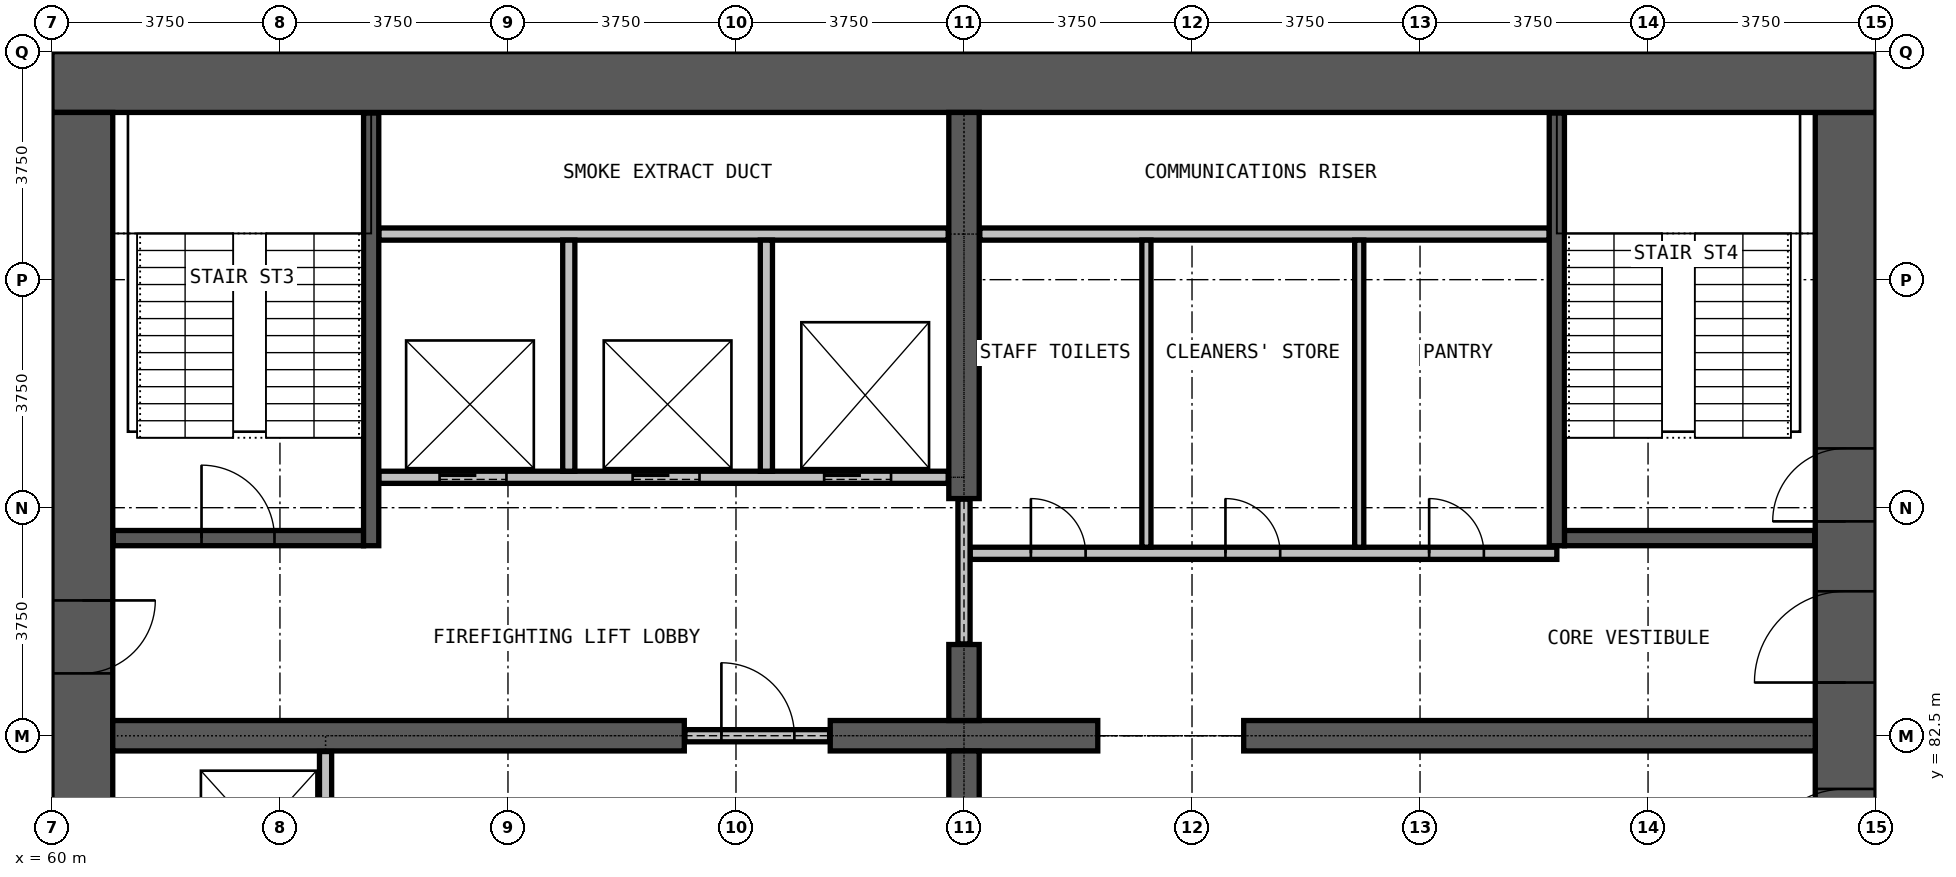
"""IFC4 building model, lengths in metres.
Left out: names, types, materials, properties, quantities, classifications, styles, units other than length and angle.
Written with IfcOpenShell. Run it as: python <this file> out.ifc"""

import sys

from ifc_helpers import new_model, si_unit, direction, frame, frame_2d, origin, place, context, subcontext, project, spatial, rectangle, extrude, element, fill, save


model = new_model("IFC4")
c1 = context("Model", 3, precision=1e-05, world=origin(), true_north=direction((0.0, 1.0)))
c2 = subcontext(c1, "Body", "Model", "MODEL_VIEW")
j1 = project(units=[si_unit("LENGTHUNIT", "METRE"), si_unit("PLANEANGLEUNIT", "RADIAN")], contexts=[c1])
p1 = place(None, origin())
s1 = spatial("IfcSite", under=j1, at=p1, CompositionType="ELEMENT")
p2 = place(p1, origin())
s2 = spatial("IfcBuilding", under=s1, at=p2, CompositionType="ELEMENT")
p3 = place(p2, frame((0.0, 0.0, 35.0)))
s3 = spatial("IfcBuildingStorey", under=s2, at=p3, CompositionType="ELEMENT", Elevation=35.0)
p4 = place(p3, frame((89.5, 72.25, 0.0), z_axis=(0.0, 0.0, 1.0), x_axis=(0.0, 1.0, 0.0)))
e1 = element("IfcWall", 1, at=p4, inside=s3, PredefinedType="SHEAR", context=c2, shape_type="SweptSolid", body=[
    extrude(rectangle(XDim=20.5, YDim=1.0, at=frame_2d((10.25, 0.0))), origin(), (0.0, 0.0, 1.0), 4.5),
])
p5 = place(p4, frame((0.275, 0.0, 0.0)))
e2 = element("IfcOpeningElement", 2, at=p5, cuts=e1, PredefinedType="OPENING", context=c2, shape_type="SweptSolid", body=[
    extrude(rectangle(XDim=1.2, YDim=2.2, at=frame_2d((0.6, 1.1))), frame((0.0, 0.51, 0.0), z_axis=(0.0, -1.0, 0.0), x_axis=(1.0, 0.0, 0.0)), (0.0, 0.0, 1.0), 1.02),
])
p6 = place(p4, frame((13.775, 0.0, 0.0)))
e3 = element("IfcOpeningElement", 3, at=p6, cuts=e1, PredefinedType="OPENING", context=c2, shape_type="SweptSolid", body=[
    extrude(rectangle(XDim=1.2, YDim=2.2, at=frame_2d((0.6, 1.1))), frame((0.0, 0.51, 0.0), z_axis=(0.0, -1.0, 0.0), x_axis=(1.0, 0.0, 0.0)), (0.0, 0.0, 1.0), 1.02),
])
p7 = place(p4, frame((7.875, 0.0, 0.0)))
e4 = element("IfcOpeningElement", 4, at=p7, cuts=e1, PredefinedType="OPENING", context=c2, shape_type="SweptSolid", body=[
    extrude(rectangle(XDim=1.5, YDim=2.2, at=frame_2d((0.75, 1.1))), frame((0.0, 0.51, 0.0), z_axis=(0.0, -1.0, 0.0), x_axis=(1.0, 0.0, 0.0)), (0.0, 0.0, 1.0), 1.02),
])
p8 = place(p4, frame((11.125, 0.0, 0.0)))
e5 = element("IfcOpeningElement", 5, at=p8, cuts=e1, PredefinedType="OPENING", context=c2, shape_type="SweptSolid", body=[
    extrude(rectangle(XDim=1.5, YDim=2.2, at=frame_2d((0.75, 1.1))), frame((0.0, 0.51, 0.0), z_axis=(0.0, -1.0, 0.0), x_axis=(1.0, 0.0, 0.0)), (0.0, 0.0, 1.0), 1.02),
])
p9 = place(p3, frame((90.0, 93.25, 0.0), z_axis=(0.0, 0.0, 1.0), x_axis=(-1.0, 0.0, 0.0)))
e6 = element("IfcWall", 6, at=p9, inside=s3, PredefinedType="SHEAR", context=c2, shape_type="SweptSolid", body=[
    extrude(rectangle(XDim=30.0, YDim=1.0, at=frame_2d((15.0, 0.0))), origin(), (0.0, 0.0, 1.0), 4.5),
])
p10 = place(p3, frame((60.5, 92.75, 0.0), z_axis=(0.0, 0.0, 1.0), x_axis=(0.0, -1.0, 0.0)))
e7 = element("IfcWall", 7, at=p10, inside=s3, PredefinedType="SHEAR", context=c2, shape_type="SweptSolid", body=[
    extrude(rectangle(XDim=20.5, YDim=1.0, at=frame_2d((10.25, 0.0))), origin(), (0.0, 0.0, 1.0), 4.5),
])
p11 = place(p10, frame((19.025, 0.0, 0.0)))
e8 = element("IfcOpeningElement", 8, at=p11, cuts=e7, PredefinedType="OPENING", context=c2, shape_type="SweptSolid", body=[
    extrude(rectangle(XDim=1.2, YDim=2.2, at=frame_2d((0.6, 1.1))), frame((0.0, 0.51, 0.0), z_axis=(0.0, -1.0, 0.0), x_axis=(1.0, 0.0, 0.0)), (0.0, 0.0, 1.0), 1.02),
])
p12 = place(p10, frame((8.025, 0.0, 0.0)))
e9 = element("IfcOpeningElement", 9, at=p12, cuts=e7, PredefinedType="OPENING", context=c2, shape_type="SweptSolid", body=[
    extrude(rectangle(XDim=1.2, YDim=2.2, at=frame_2d((0.6, 1.1))), frame((0.0, 0.51, 0.0), z_axis=(0.0, -1.0, 0.0), x_axis=(1.0, 0.0, 0.0)), (0.0, 0.0, 1.0), 1.02),
])
p13 = place(p3, frame((61.0, 82.5, 0.0), z_axis=(0.0, 0.0, 1.0), x_axis=(1.0, 0.0, 0.0)))
e10 = element("IfcWall", 10, at=p13, inside=s3, PredefinedType="SHEAR", context=c2, shape_type="SweptSolid", body=[
    extrude(rectangle(XDim=9.4, YDim=0.5, at=frame_2d((4.7, 0.0))), origin(), (0.0, 0.0, 1.0), 4.5),
])
p14 = place(p3, frame((72.8, 82.5, 0.0), z_axis=(0.0, 0.0, 1.0), x_axis=(1.0, 0.0, 0.0)))
e11 = element("IfcWall", 11, at=p14, inside=s3, PredefinedType="SHEAR", context=c2, shape_type="SweptSolid", body=[
    extrude(rectangle(XDim=4.4, YDim=0.5, at=frame_2d((2.2, 0.0))), origin(), (0.0, 0.0, 1.0), 4.5),
])
p15 = place(p3, frame((79.6, 82.5, 0.0), z_axis=(0.0, 0.0, 1.0), x_axis=(1.0, 0.0, 0.0)))
e12 = element("IfcWall", 12, at=p15, inside=s3, PredefinedType="SHEAR", context=c2, shape_type="SweptSolid", body=[
    extrude(rectangle(XDim=9.4, YDim=0.5, at=frame_2d((4.7, 0.0))), origin(), (0.0, 0.0, 1.0), 4.5),
])
for number, where, z_axis, x_axis in (
    (13, (75.0, 81.0, 0.0), (0.0, 0.0, 1.0), (0.0, 1.0, 0.0)),
    (14, (75.0, 82.75, 0.0), (0.0, 0.0, 1.0), (0.0, 1.0, 0.0)),
):
    element("IfcWall", number, at=place(p3, frame(where, z_axis=z_axis, x_axis=x_axis)), inside=s3, PredefinedType="SHEAR", context=c2, shape_type="SweptSolid", body=[
        extrude(rectangle(XDim=1.25, YDim=0.5, at=frame_2d((0.625, 0.0))), origin(), (0.0, 0.0, 1.0), 4.5),
    ])
p16 = place(p3, frame((75.0, 86.4, 0.0), z_axis=(0.0, 0.0, 1.0), x_axis=(0.0, 1.0, 0.0)))
e15 = element("IfcWall", 15, at=p16, inside=s3, PredefinedType="SHEAR", context=c2, shape_type="SweptSolid", body=[
    extrude(rectangle(XDim=6.35, YDim=0.5, at=frame_2d((3.175, 0.0))), origin(), (0.0, 0.0, 1.0), 4.5),
])
p17 = place(p3, frame((70.41, 82.5, 0.0), z_axis=(0.0, 0.0, 1.0), x_axis=(1.0, 0.0, 0.0)))
e16 = element("IfcWall", 16, at=p17, inside=s3, PredefinedType="PARTITIONING", context=c2, shape_type="SweptSolid", body=[
    extrude(rectangle(XDim=2.38, YDim=0.2, at=frame_2d((1.19, 0.0))), origin(), (0.0, 0.0, 1.0), 2.4),
])
p18 = place(p17, frame((0.6, 0.0, 0.0)))
e17 = element("IfcOpeningElement", 17, at=p18, cuts=e16, PredefinedType="OPENING", context=c2, shape_type="SweptSolid", body=[
    extrude(rectangle(XDim=1.2, YDim=2.2, at=frame_2d((0.6, 1.1))), frame((0.0, 0.11, 0.0), z_axis=(0.0, -1.0, 0.0), x_axis=(1.0, 0.0, 0.0)), (0.0, 0.0, 1.0), 0.22),
])
p19 = place(p3, frame((75.1, 85.5, 0.0), z_axis=(0.0, 0.0, 1.0), x_axis=(1.0, 0.0, 0.0)))
e18 = element("IfcWall", 18, at=p19, inside=s3, PredefinedType="PARTITIONING", context=c2, shape_type="SweptSolid", body=[
    extrude(rectangle(XDim=9.65, YDim=0.2, at=frame_2d((4.825, 0.0))), origin(), (0.0, 0.0, 1.0), 4.2),
])
p20 = place(p19, frame((1.0, 0.0, 0.0)))
e19 = element("IfcOpeningElement", 19, at=p20, cuts=e18, PredefinedType="OPENING", context=c2, shape_type="SweptSolid", body=[
    extrude(rectangle(XDim=0.9, YDim=2.2, at=frame_2d((0.45, 1.1))), frame((0.0, 0.11, 0.0), z_axis=(0.0, -1.0, 0.0), x_axis=(1.0, 0.0, 0.0)), (0.0, 0.0, 1.0), 0.22),
])
p21 = place(p19, frame((4.2, 0.0, 0.0)))
e20 = element("IfcOpeningElement", 20, at=p21, cuts=e18, PredefinedType="OPENING", context=c2, shape_type="SweptSolid", body=[
    extrude(rectangle(XDim=0.9, YDim=2.2, at=frame_2d((0.45, 1.1))), frame((0.0, 0.11, 0.0), z_axis=(0.0, -1.0, 0.0), x_axis=(1.0, 0.0, 0.0)), (0.0, 0.0, 1.0), 0.22),
])
p22 = place(p19, frame((7.55, 0.0, 0.0)))
e21 = element("IfcOpeningElement", 21, at=p22, cuts=e18, PredefinedType="OPENING", context=c2, shape_type="SweptSolid", body=[
    extrude(rectangle(XDim=0.9, YDim=2.2, at=frame_2d((0.45, 1.1))), frame((0.0, 0.11, 0.0), z_axis=(0.0, -1.0, 0.0), x_axis=(1.0, 0.0, 0.0)), (0.0, 0.0, 1.0), 0.22),
])
p23 = place(p3, frame((75.26, 90.75, 0.0), z_axis=(0.0, 0.0, 1.0), x_axis=(1.0, 0.0, 0.0)))
e22 = element("IfcWall", 22, at=p23, inside=s3, PredefinedType="PARTITIONING", context=c2, shape_type="SweptSolid", body=[
    extrude(rectangle(XDim=9.365, YDim=0.2, at=frame_2d((4.683, 0.0))), origin(), (0.0, 0.0, 1.0), 4.2),
])
p24 = place(p3, frame((75.0, 84.01, 0.0), z_axis=(0.0, 0.0, 1.0), x_axis=(0.0, 1.0, 0.0)))
e23 = element("IfcWall", 23, at=p24, inside=s3, PredefinedType="PARTITIONING", context=c2, shape_type="SweptSolid", body=[
    extrude(rectangle(XDim=2.38, YDim=0.2, at=frame_2d((1.19, 0.0))), origin(), (0.0, 0.0, 1.0), 2.4),
])
for number, where, z_axis, x_axis in (
    (24, (78.0, 85.6, 0.0), (0.0, 0.0, 1.0), (0.0, 1.0, 0.0)),
    (25, (81.5, 85.6, 0.0), (0.0, 0.0, 1.0), (0.0, 1.0, 0.0)),
):
    element("IfcWall", number, at=place(p3, frame(where, z_axis=z_axis, x_axis=x_axis)), inside=s3, PredefinedType="PARTITIONING", context=c2, shape_type="SweptSolid", body=[
        extrude(rectangle(XDim=5.05, YDim=0.15, at=frame_2d((2.525, 0.0))), origin(), (0.0, 0.0, 1.0), 4.2),
    ])
p25 = place(p3, frame((65.375, 86.75, 0.0), z_axis=(0.0, 0.0, 1.0), x_axis=(1.0, 0.0, 0.0)))
e26 = element("IfcWall", 26, at=p25, inside=s3, PredefinedType="PARTITIONING", context=c2, shape_type="SweptSolid", body=[
    extrude(rectangle(XDim=9.365, YDim=0.2, at=frame_2d((4.683, 0.0))), origin(), (0.0, 0.0, 1.0), 4.2),
])
p26 = place(p25, frame((1.0, 0.0, 0.0)))
e27 = element("IfcOpeningElement", 27, at=p26, cuts=e26, PredefinedType="OPENING", context=c2, shape_type="SweptSolid", body=[
    extrude(rectangle(XDim=1.1, YDim=2.2, at=frame_2d((0.55, 1.1))), frame((0.0, 0.11, 0.0), z_axis=(0.0, -1.0, 0.0), x_axis=(1.0, 0.0, 0.0)), (0.0, 0.0, 1.0), 0.22),
])
p27 = place(p25, frame((4.175, 0.0, 0.0)))
e28 = element("IfcOpeningElement", 28, at=p27, cuts=e26, PredefinedType="OPENING", context=c2, shape_type="SweptSolid", body=[
    extrude(rectangle(XDim=1.1, YDim=2.2, at=frame_2d((0.55, 1.1))), frame((0.0, 0.11, 0.0), z_axis=(0.0, -1.0, 0.0), x_axis=(1.0, 0.0, 0.0)), (0.0, 0.0, 1.0), 0.22),
])
p28 = place(p25, frame((7.325, 0.0, 0.0)))
e29 = element("IfcOpeningElement", 29, at=p28, cuts=e26, PredefinedType="OPENING", context=c2, shape_type="SweptSolid", body=[
    extrude(rectangle(XDim=1.1, YDim=2.2, at=frame_2d((0.55, 1.1))), frame((0.0, 0.11, 0.0), z_axis=(0.0, -1.0, 0.0), x_axis=(1.0, 0.0, 0.0)), (0.0, 0.0, 1.0), 0.22),
])
p29 = place(p3, frame((65.375, 90.75, 0.0), z_axis=(0.0, 0.0, 1.0), x_axis=(1.0, 0.0, 0.0)))
e30 = element("IfcWall", 30, at=p29, inside=s3, PredefinedType="PARTITIONING", context=c2, shape_type="SweptSolid", body=[
    extrude(rectangle(XDim=9.365, YDim=0.2, at=frame_2d((4.683, 0.0))), origin(), (0.0, 0.0, 1.0), 4.2),
])
p30 = place(p3, frame((64.5, 79.375, 0.0), z_axis=(0.0, 0.0, 1.0), x_axis=(0.0, 1.0, 0.0)))
e31 = element("IfcWall", 31, at=p30, inside=s3, PredefinedType="PARTITIONING", context=c2, shape_type="SweptSolid", body=[
    extrude(rectangle(XDim=2.865, YDim=0.2, at=frame_2d((1.433, 0.0))), origin(), (0.0, 0.0, 1.0), 4.2),
])
for number, where, z_axis, x_axis in (
    (32, (68.5, 86.85, 0.0), (0.0, 0.0, 1.0), (0.0, 1.0, 0.0)),
    (33, (71.75, 86.85, 0.0), (0.0, 0.0, 1.0), (0.0, 1.0, 0.0)),
):
    element("IfcWall", number, at=place(p3, frame(where, z_axis=z_axis, x_axis=x_axis)), inside=s3, PredefinedType="PARTITIONING", context=c2, shape_type="SweptSolid", body=[
        extrude(rectangle(XDim=3.8, YDim=0.2, at=frame_2d((1.9, 0.0))), origin(), (0.0, 0.0, 1.0), 4.2),
    ])
p31 = place(p3, frame((61.01, 85.75, 0.0), z_axis=(0.0, 0.0, 1.0), x_axis=(1.0, 0.0, 0.0)))
e34 = element("IfcWall", 34, at=p31, inside=s3, PredefinedType="PARTITIONING", context=c2, shape_type="SweptSolid", body=[
    extrude(rectangle(XDim=4.115, YDim=0.25, at=frame_2d((2.058, 0.0))), origin(), (0.0, 0.0, 1.0), 4.2),
])
p32 = place(p31, frame((1.45, 0.0, 0.0)))
e35 = element("IfcOpeningElement", 35, at=p32, cuts=e34, PredefinedType="OPENING", context=c2, shape_type="SweptSolid", body=[
    extrude(rectangle(XDim=1.2, YDim=2.2, at=frame_2d((0.6, 1.1))), frame((0.0, 0.135, 0.0), z_axis=(0.0, -1.0, 0.0), x_axis=(1.0, 0.0, 0.0)), (0.0, 0.0, 1.0), 0.27),
])
p33 = place(p3, frame((84.875, 85.75, 0.0), z_axis=(0.0, 0.0, 1.0), x_axis=(1.0, 0.0, 0.0)))
e36 = element("IfcWall", 36, at=p33, inside=s3, PredefinedType="PARTITIONING", context=c2, shape_type="SweptSolid", body=[
    extrude(rectangle(XDim=4.115, YDim=0.25, at=frame_2d((2.058, 0.0))), origin(), (0.0, 0.0, 1.0), 4.2),
])
for number, where, z_axis, x_axis in (
    (37, (65.25, 85.625, 0.0), (0.0, 0.0, 1.0), (0.0, 1.0, 0.0)),
    (38, (84.75, 85.625, 0.0), (0.0, 0.0, 1.0), (0.0, 1.0, 0.0)),
):
    element("IfcWall", number, at=place(p3, frame(where, z_axis=z_axis, x_axis=x_axis)), inside=s3, PredefinedType="PARTITIONING", context=c2, shape_type="SweptSolid", body=[
        extrude(rectangle(XDim=7.115, YDim=0.25, at=frame_2d((3.558, 0.0))), origin(), (0.0, 0.0, 1.0), 4.2),
    ])
p34 = place(p26, origin())
e39 = element("IfcDoor", 39, at=p34, inside=s3, OperationType="DOUBLE_DOOR_SLIDING", PredefinedType="DOOR", context=c2, shape_type="SweptSolid", body=[
    extrude(rectangle(XDim=1.1, YDim=2.2, at=frame_2d((0.55, 1.1))), frame((0.0, 0.025, 0.0), z_axis=(0.0, -1.0, 0.0), x_axis=(1.0, 0.0, 0.0)), (0.0, 0.0, 1.0), 0.05),
])
fill(e27, e39)
p35 = place(p27, origin())
e40 = element("IfcDoor", 40, at=p35, inside=s3, OperationType="DOUBLE_DOOR_SLIDING", PredefinedType="DOOR", context=c2, shape_type="SweptSolid", body=[
    extrude(rectangle(XDim=1.1, YDim=2.2, at=frame_2d((0.55, 1.1))), frame((0.0, 0.025, 0.0), z_axis=(0.0, -1.0, 0.0), x_axis=(1.0, 0.0, 0.0)), (0.0, 0.0, 1.0), 0.05),
])
fill(e28, e40)
p36 = place(p28, origin())
e41 = element("IfcDoor", 41, at=p36, inside=s3, OperationType="DOUBLE_DOOR_SLIDING", PredefinedType="DOOR", context=c2, shape_type="SweptSolid", body=[
    extrude(rectangle(XDim=1.1, YDim=2.2, at=frame_2d((0.55, 1.1))), frame((0.0, 0.025, 0.0), z_axis=(0.0, -1.0, 0.0), x_axis=(1.0, 0.0, 0.0)), (0.0, 0.0, 1.0), 0.05),
])
fill(e29, e41)
p37 = place(p18, origin())
e42 = element("IfcDoor", 42, at=p37, inside=s3, OperationType="SINGLE_SWING_LEFT", PredefinedType="DOOR", context=c2, shape_type="SweptSolid", body=[
    extrude(rectangle(XDim=1.2, YDim=2.2, at=frame_2d((0.6, 1.1))), frame((0.0, 0.025, 0.0), z_axis=(0.0, -1.0, 0.0), x_axis=(1.0, 0.0, 0.0)), (0.0, 0.0, 1.0), 0.05),
])
fill(e17, e42)
p38 = place(p32, origin())
e43 = element("IfcDoor", 43, at=p38, inside=s3, OperationType="SINGLE_SWING_LEFT", PredefinedType="DOOR", context=c2, shape_type="SweptSolid", body=[
    extrude(rectangle(XDim=1.2, YDim=2.2, at=frame_2d((0.6, 1.1))), frame((0.0, 0.025, 0.0), z_axis=(0.0, -1.0, 0.0), x_axis=(1.0, 0.0, 0.0)), (0.0, 0.0, 1.0), 0.05),
])
fill(e35, e43)
p39 = place(p6, origin())
e44 = element("IfcDoor", 44, at=p39, inside=s3, OperationType="SINGLE_SWING_LEFT", PredefinedType="DOOR", context=c2, shape_type="SweptSolid", body=[
    extrude(rectangle(XDim=1.2, YDim=2.2, at=frame_2d((0.6, 1.1))), frame((0.0, 0.025, 0.0), z_axis=(0.0, -1.0, 0.0), x_axis=(1.0, 0.0, 0.0)), (0.0, 0.0, 1.0), 0.05),
])
fill(e3, e44)
p40 = place(p7, origin())
e45 = element("IfcDoor", 45, at=p40, inside=s3, OperationType="DOUBLE_DOOR_SINGLE_SWING", PredefinedType="DOOR", context=c2, shape_type="SweptSolid", body=[
    extrude(rectangle(XDim=1.5, YDim=2.2, at=frame_2d((0.75, 1.1))), frame((0.0, 0.025, 0.0), z_axis=(0.0, -1.0, 0.0), x_axis=(1.0, 0.0, 0.0)), (0.0, 0.0, 1.0), 0.05),
])
fill(e4, e45)
p41 = place(p12, origin())
e46 = element("IfcDoor", 46, at=p41, inside=s3, OperationType="SINGLE_SWING_RIGHT", PredefinedType="DOOR", context=c2, shape_type="SweptSolid", body=[
    extrude(rectangle(XDim=1.2, YDim=2.2, at=frame_2d((0.6, 1.1))), frame((0.0, 0.025, 0.0), z_axis=(0.0, -1.0, 0.0), x_axis=(1.0, 0.0, 0.0)), (0.0, 0.0, 1.0), 0.05),
])
fill(e9, e46)
p42 = place(p8, origin())
e47 = element("IfcDoor", 47, at=p42, inside=s3, OperationType="DOUBLE_DOOR_SINGLE_SWING", PredefinedType="DOOR", context=c2, shape_type="SweptSolid", body=[
    extrude(rectangle(XDim=1.5, YDim=2.2, at=frame_2d((0.75, 1.1))), frame((0.0, 0.025, 0.0), z_axis=(0.0, -1.0, 0.0), x_axis=(1.0, 0.0, 0.0)), (0.0, 0.0, 1.0), 0.05),
])
fill(e5, e47)
p43 = place(p20, origin())
e48 = element("IfcDoor", 48, at=p43, inside=s3, OperationType="SINGLE_SWING_LEFT", PredefinedType="DOOR", context=c2, shape_type="SweptSolid", body=[
    extrude(rectangle(XDim=0.9, YDim=2.2, at=frame_2d((0.45, 1.1))), frame((0.0, 0.025, 0.0), z_axis=(0.0, -1.0, 0.0), x_axis=(1.0, 0.0, 0.0)), (0.0, 0.0, 1.0), 0.05),
])
fill(e19, e48)
p44 = place(p21, origin())
e49 = element("IfcDoor", 49, at=p44, inside=s3, OperationType="SINGLE_SWING_LEFT", PredefinedType="DOOR", context=c2, shape_type="SweptSolid", body=[
    extrude(rectangle(XDim=0.9, YDim=2.2, at=frame_2d((0.45, 1.1))), frame((0.0, 0.025, 0.0), z_axis=(0.0, -1.0, 0.0), x_axis=(1.0, 0.0, 0.0)), (0.0, 0.0, 1.0), 0.05),
])
fill(e20, e49)
p45 = place(p22, origin())
e50 = element("IfcDoor", 50, at=p45, inside=s3, OperationType="SINGLE_SWING_RIGHT", PredefinedType="DOOR", context=c2, shape_type="SweptSolid", body=[
    extrude(rectangle(XDim=0.9, YDim=2.2, at=frame_2d((0.45, 1.1))), frame((0.0, 0.025, 0.0), z_axis=(0.0, -1.0, 0.0), x_axis=(1.0, 0.0, 0.0)), (0.0, 0.0, 1.0), 0.05),
])
fill(e21, e50)
save(model, sys.argv[1])
